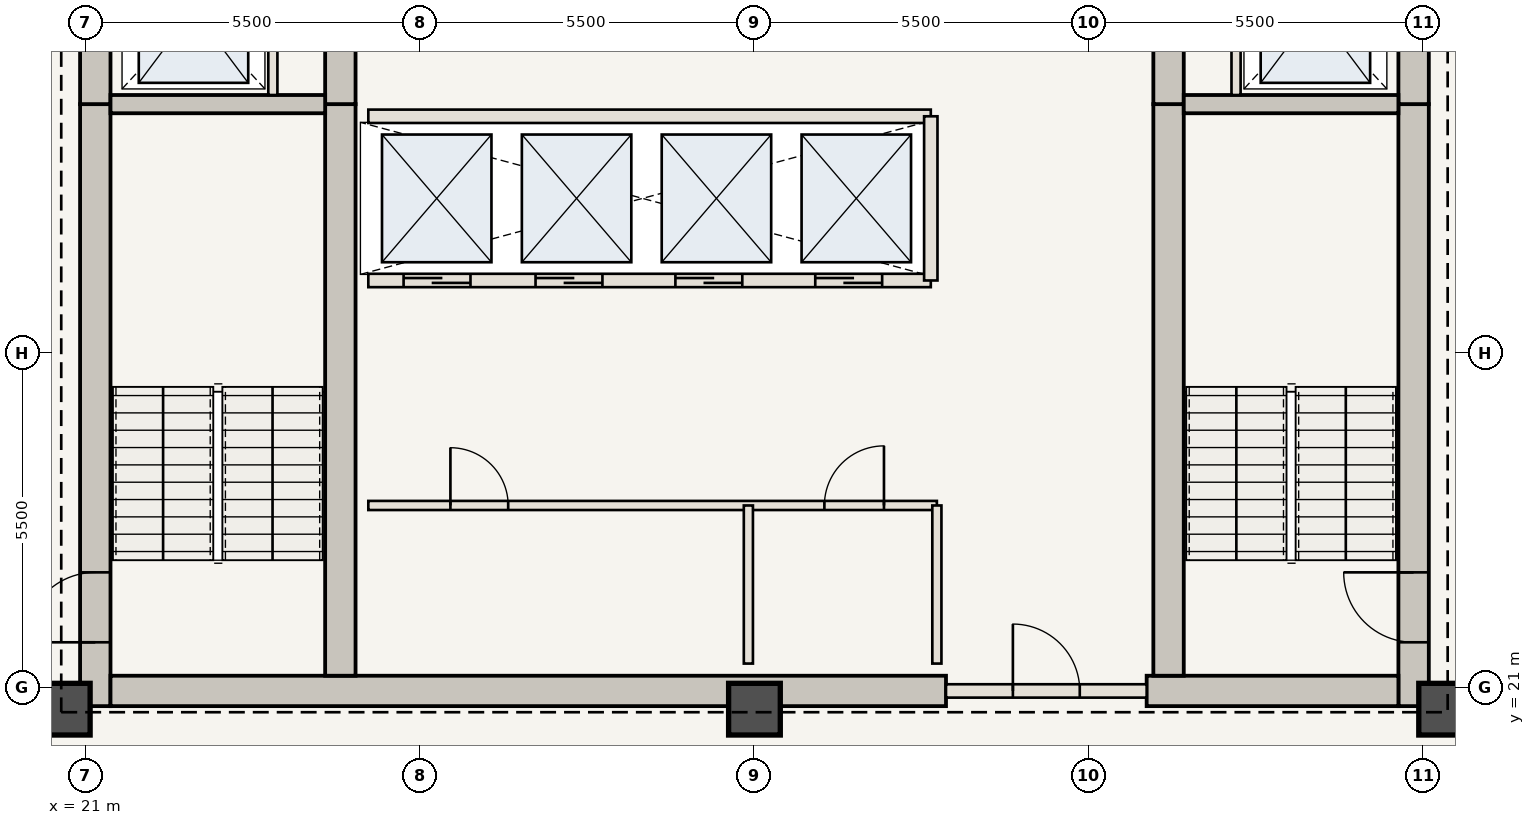
"""IFC4 building model, lengths in metres.
Left out: names, types, materials, properties, quantities, classifications, styles, units other than length and angle.
Written with IfcOpenShell. Run it as: python <this file> out.ifc"""

import sys

from ifc_helpers import new_model, si_unit, direction, frame, frame_2d, origin, origin_2d, place, context, subcontext, project, spatial, rectangle, extrude, element, fill, save


model = new_model("IFC4")
c1 = context("Model", 3, precision=1e-05, world=origin(), true_north=direction((0.0, 1.0)))
c2 = subcontext(c1, "Body", "Model", "MODEL_VIEW")
j1 = project(units=[si_unit("LENGTHUNIT", "METRE"), si_unit("PLANEANGLEUNIT", "RADIAN")], contexts=[c1])
p1 = place(None, origin())
s1 = spatial("IfcSite", under=j1, at=p1, CompositionType="ELEMENT")
p2 = place(p1, origin())
s2 = spatial("IfcBuilding", under=s1, at=p2, CompositionType="ELEMENT")
p3 = place(p2, frame((0.0, 0.0, 244.65)))
s3 = spatial("IfcBuildingStorey", under=s2, at=p3, CompositionType="ELEMENT", Elevation=244.65)
p4 = place(p3, frame((21.16, 20.7, 0.0), z_axis=(0.0, 0.0, 1.0), x_axis=(0.0, 1.0, 0.0)))
e1 = element("IfcWall", 1, at=p4, inside=s3, PredefinedType="SHEAR", context=c2, shape_type="SweptSolid", body=[
    extrude(rectangle(XDim=9.9, YDim=0.5, at=frame_2d((4.95, 0.0))), origin(), (0.0, 0.0, 1.0), 3.85),
])
p5 = place(p4, frame((1.05, 0.0, 0.0)))
e2 = element("IfcOpeningElement", 2, at=p5, cuts=e1, PredefinedType="OPENING", context=c2, shape_type="SweptSolid", body=[
    extrude(rectangle(XDim=1.15, YDim=2.15, at=frame_2d((0.575, 1.075))), frame((0.0, 0.26, 0.0), z_axis=(0.0, -1.0, 0.0), x_axis=(1.0, 0.0, 0.0)), (0.0, 0.0, 1.0), 0.52),
])
p6 = place(p3, frame((21.16, 30.6, 0.0), z_axis=(0.0, 0.0, 1.0), x_axis=(0.0, 1.0, 0.0)))
e3 = element("IfcWall", 3, at=p6, inside=s3, PredefinedType="SHEAR", context=c2, shape_type="SweptSolid", body=[
    extrude(rectangle(XDim=12.65, YDim=0.5, at=frame_2d((6.325, 0.0))), origin(), (0.0, 0.0, 1.0), 3.85),
])
p7 = place(p6, frame((4.2, 0.0, 0.0)))
e4 = element("IfcOpeningElement", 4, at=p7, cuts=e3, PredefinedType="OPENING", context=c2, shape_type="SweptSolid", body=[
    extrude(rectangle(XDim=1.1, YDim=2.15, at=frame_2d((0.55, 1.075))), frame((0.0, 0.26, 0.0), z_axis=(0.0, -1.0, 0.0), x_axis=(1.0, 0.0, 0.0)), (0.0, 0.0, 1.0), 0.52),
])
p8 = place(p6, frame((8.05, 0.0, 0.0)))
e5 = element("IfcOpeningElement", 5, at=p8, cuts=e3, PredefinedType="OPENING", context=c2, shape_type="SweptSolid", body=[
    extrude(rectangle(XDim=0.92, YDim=2.1, at=frame_2d((0.46, 1.05))), frame((0.0, 0.26, 0.0), z_axis=(0.0, -1.0, 0.0), x_axis=(1.0, 0.0, 0.0)), (0.0, 0.0, 1.0), 0.52),
])
p9 = place(p6, frame((9.45, 0.0, 0.0)))
e6 = element("IfcOpeningElement", 6, at=p9, cuts=e3, PredefinedType="OPENING", context=c2, shape_type="SweptSolid", body=[
    extrude(rectangle(XDim=0.88, YDim=2.1, at=frame_2d((0.44, 1.05))), frame((0.0, 0.26, 0.0), z_axis=(0.0, -1.0, 0.0), x_axis=(1.0, 0.0, 0.0)), (0.0, 0.0, 1.0), 0.52),
])
p10 = place(p6, frame((10.85, 0.0, 0.0)))
e7 = element("IfcOpeningElement", 7, at=p10, cuts=e3, PredefinedType="OPENING", context=c2, shape_type="SweptSolid", body=[
    extrude(rectangle(XDim=0.88, YDim=2.1, at=frame_2d((0.44, 1.05))), frame((0.0, 0.26, 0.0), z_axis=(0.0, -1.0, 0.0), x_axis=(1.0, 0.0, 0.0)), (0.0, 0.0, 1.0), 0.52),
])
p11 = place(p3, frame((42.84, 20.7, 0.0), z_axis=(0.0, 0.0, 1.0), x_axis=(0.0, 1.0, 0.0)))
e8 = element("IfcWall", 8, at=p11, inside=s3, PredefinedType="SHEAR", context=c2, shape_type="SweptSolid", body=[
    extrude(rectangle(XDim=9.9, YDim=0.5, at=frame_2d((4.95, 0.0))), origin(), (0.0, 0.0, 1.0), 3.85),
])
p12 = place(p11, frame((1.05, 0.0, 0.0)))
e9 = element("IfcOpeningElement", 9, at=p12, cuts=e8, PredefinedType="OPENING", context=c2, shape_type="SweptSolid", body=[
    extrude(rectangle(XDim=1.15, YDim=2.15, at=frame_2d((0.575, 1.075))), frame((0.0, 0.26, 0.0), z_axis=(0.0, -1.0, 0.0), x_axis=(1.0, 0.0, 0.0)), (0.0, 0.0, 1.0), 0.52),
])
p13 = place(p3, frame((42.84, 30.6, 0.0), z_axis=(0.0, 0.0, 1.0), x_axis=(0.0, 1.0, 0.0)))
e10 = element("IfcWall", 10, at=p13, inside=s3, PredefinedType="SHEAR", context=c2, shape_type="SweptSolid", body=[
    extrude(rectangle(XDim=12.65, YDim=0.5, at=frame_2d((6.325, 0.0))), origin(), (0.0, 0.0, 1.0), 3.85),
])
p14 = place(p13, frame((4.2, 0.0, 0.0)))
e11 = element("IfcOpeningElement", 11, at=p14, cuts=e10, PredefinedType="OPENING", context=c2, shape_type="SweptSolid", body=[
    extrude(rectangle(XDim=1.1, YDim=2.15, at=frame_2d((0.55, 1.075))), frame((0.0, 0.26, 0.0), z_axis=(0.0, -1.0, 0.0), x_axis=(1.0, 0.0, 0.0)), (0.0, 0.0, 1.0), 0.52),
])
p15 = place(p13, frame((9.2, 0.0, 0.0)))
e12 = element("IfcOpeningElement", 12, at=p15, cuts=e10, PredefinedType="OPENING", context=c2, shape_type="SweptSolid", body=[
    extrude(rectangle(XDim=0.92, YDim=2.1, at=frame_2d((0.46, 1.05))), frame((0.0, 0.26, 0.0), z_axis=(0.0, -1.0, 0.0), x_axis=(1.0, 0.0, 0.0)), (0.0, 0.0, 1.0), 0.52),
])
p16 = place(p3, frame((21.41, 20.95, 0.0), z_axis=(0.0, 0.0, 1.0), x_axis=(1.0, 0.0, 0.0)))
e13 = element("IfcWall", 13, at=p16, inside=s3, PredefinedType="SHEAR", context=c2, shape_type="SweptSolid", body=[
    extrude(rectangle(XDim=13.74, YDim=0.5, at=frame_2d((6.87, 0.0))), origin(), (0.0, 0.0, 1.0), 3.85),
])
p17 = place(p3, frame((38.45, 20.95, 0.0), z_axis=(0.0, 0.0, 1.0), x_axis=(1.0, 0.0, 0.0)))
e14 = element("IfcWall", 14, at=p17, inside=s3, PredefinedType="SHEAR", context=c2, shape_type="SweptSolid", body=[
    extrude(rectangle(XDim=4.14, YDim=0.5, at=frame_2d((2.07, 0.0))), origin(), (0.0, 0.0, 1.0), 3.85),
])
p18 = place(p3, frame((25.19, 21.2, 0.0), z_axis=(0.0, 0.0, 1.0), x_axis=(0.0, 1.0, 0.0)))
e15 = element("IfcWall", 15, at=p18, inside=s3, PredefinedType="SHEAR", context=c2, shape_type="SweptSolid", body=[
    extrude(rectangle(XDim=9.4, YDim=0.5, at=frame_2d((4.7, 0.0))), origin(), (0.0, 0.0, 1.0), 3.85),
])
p19 = place(p3, frame((25.19, 30.6, 0.0), z_axis=(0.0, 0.0, 1.0), x_axis=(0.0, 1.0, 0.0)))
e16 = element("IfcWall", 16, at=p19, inside=s3, PredefinedType="SHEAR", context=c2, shape_type="SweptSolid", body=[
    extrude(rectangle(XDim=12.15, YDim=0.5, at=frame_2d((6.075, 0.0))), origin(), (0.0, 0.0, 1.0), 3.85),
])
p20 = place(p19, frame((6.25, 0.0, 0.0)))
e17 = element("IfcOpeningElement", 17, at=p20, cuts=e16, PredefinedType="OPENING", context=c2, shape_type="SweptSolid", body=[
    extrude(rectangle(XDim=1.1, YDim=2.15, at=frame_2d((0.55, 1.075))), frame((0.0, 0.26, 0.0), z_axis=(0.0, -1.0, 0.0), x_axis=(1.0, 0.0, 0.0)), (0.0, 0.0, 1.0), 0.52),
])
p21 = place(p3, frame((38.81, 21.2, 0.0), z_axis=(0.0, 0.0, 1.0), x_axis=(0.0, 1.0, 0.0)))
e18 = element("IfcWall", 18, at=p21, inside=s3, PredefinedType="SHEAR", context=c2, shape_type="SweptSolid", body=[
    extrude(rectangle(XDim=9.4, YDim=0.5, at=frame_2d((4.7, 0.0))), origin(), (0.0, 0.0, 1.0), 3.85),
])
p22 = place(p3, frame((38.81, 30.6, 0.0), z_axis=(0.0, 0.0, 1.0), x_axis=(0.0, 1.0, 0.0)))
e19 = element("IfcWall", 19, at=p22, inside=s3, PredefinedType="SHEAR", context=c2, shape_type="SweptSolid", body=[
    extrude(rectangle(XDim=12.15, YDim=0.5, at=frame_2d((6.075, 0.0))), origin(), (0.0, 0.0, 1.0), 3.85),
])
for number, where, z_axis, x_axis in (
    (20, (20.65, 20.65, 0.0), (0.0, 0.0, 1.0), (1.0, 0.0, 0.0)),
    (21, (32.0, 20.65, 0.0), (0.0, 0.0, 1.0), (1.0, 0.0, 0.0)),
    (22, (43.35, 20.65, 0.0), (0.0, 0.0, 1.0), (1.0, 0.0, 0.0)),
):
    element("IfcColumn", number, at=place(p3, frame(where, z_axis=z_axis, x_axis=x_axis)), inside=s3, PredefinedType="COLUMN", context=c2, shape_type="SweptSolid", body=[
        extrude(rectangle(XDim=0.85, YDim=0.85, at=origin_2d()), origin(), (0.0, 0.0, 1.0), 3.85),
    ])
for number, where, z_axis, x_axis in (
    (23, (21.41, 30.6, 0.0), (0.0, 0.0, 1.0), (1.0, 0.0, 0.0)),
    (24, (39.06, 30.6, 0.0), (0.0, 0.0, 1.0), (1.0, 0.0, 0.0)),
):
    element("IfcWall", number, at=place(p3, frame(where, z_axis=z_axis, x_axis=x_axis)), inside=s3, PredefinedType="SHEAR", context=c2, shape_type="SweptSolid", body=[
        extrude(rectangle(XDim=3.53, YDim=0.3, at=frame_2d((1.765, 0.0))), origin(), (0.0, 0.0, 1.0), 3.685),
    ])
for number, where, z_axis, x_axis in (
    (25, (24.08, 30.75, 0.0), (0.0, 0.0, 1.0), (0.0, 1.0, 0.0)),
    (26, (39.92, 30.75, 0.0), (0.0, 0.0, 1.0), (0.0, 1.0, 0.0)),
):
    element("IfcWall", number, at=place(p3, frame(where, z_axis=z_axis, x_axis=x_axis)), inside=s3, PredefinedType="STANDARD", context=c2, shape_type="SweptSolid", body=[
        extrude(rectangle(XDim=2.65, YDim=0.15, at=frame_2d((1.325, 0.0))), origin(), (0.0, 0.0, 1.0), 3.685),
    ])
p23 = place(p3, frame((35.15, 20.95, 0.0), z_axis=(0.0, 0.0, 1.0), x_axis=(1.0, 0.0, 0.0)))
e27 = element("IfcWall", 27, at=p23, inside=s3, PredefinedType="STANDARD", context=c2, shape_type="SweptSolid", body=[
    extrude(rectangle(XDim=3.3, YDim=0.22, at=frame_2d((1.65, 0.0))), origin(), (0.0, 0.0, 1.0), 3.685),
])
p24 = place(p23, frame((1.1, 0.0, 0.0)))
e28 = element("IfcOpeningElement", 28, at=p24, cuts=e27, PredefinedType="OPENING", context=c2, shape_type="SweptSolid", body=[
    extrude(rectangle(XDim=1.1, YDim=2.15, at=frame_2d((0.55, 1.075))), frame((0.0, 0.12, 0.0), z_axis=(0.0, -1.0, 0.0), x_axis=(1.0, 0.0, 0.0)), (0.0, 0.0, 1.0), 0.24),
])
p25 = place(p3, frame((25.65, 24.0, 0.0), z_axis=(0.0, 0.0, 1.0), x_axis=(1.0, 0.0, 0.0)))
e29 = element("IfcWall", 29, at=p25, inside=s3, PredefinedType="STANDARD", context=c2, shape_type="SweptSolid", body=[
    extrude(rectangle(XDim=9.35, YDim=0.15, at=frame_2d((4.675, 0.0))), origin(), (0.0, 0.0, 1.0), 3.685),
])
p26 = place(p25, frame((1.35, 0.0, 0.0)))
e30 = element("IfcOpeningElement", 30, at=p26, cuts=e29, PredefinedType="OPENING", context=c2, shape_type="SweptSolid", body=[
    extrude(rectangle(XDim=0.95, YDim=2.15, at=frame_2d((0.475, 1.075))), frame((0.0, 0.085, 0.0), z_axis=(0.0, -1.0, 0.0), x_axis=(1.0, 0.0, 0.0)), (0.0, 0.0, 1.0), 0.17),
])
p27 = place(p25, frame((7.5, 0.0, 0.0)))
e31 = element("IfcOpeningElement", 31, at=p27, cuts=e29, PredefinedType="OPENING", context=c2, shape_type="SweptSolid", body=[
    extrude(rectangle(XDim=0.98, YDim=2.2, at=frame_2d((0.49, 1.1))), frame((0.0, 0.085, 0.0), z_axis=(0.0, -1.0, 0.0), x_axis=(1.0, 0.0, 0.0)), (0.0, 0.0, 1.0), 0.17),
])
for number, where, z_axis, x_axis in (
    (32, (31.9, 21.4, 0.0), (0.0, 0.0, 1.0), (0.0, 1.0, 0.0)),
    (33, (35.0, 21.4, 0.0), (0.0, 0.0, 1.0), (0.0, 1.0, 0.0)),
):
    element("IfcWall", number, at=place(p3, frame(where, z_axis=z_axis, x_axis=x_axis)), inside=s3, PredefinedType="STANDARD", context=c2, shape_type="SweptSolid", body=[
        extrude(rectangle(XDim=2.6, YDim=0.15, at=frame_2d((1.3, 0.0))), origin(), (0.0, 0.0, 1.0), 3.685),
    ])
p28 = place(p3, frame((25.65, 27.7, 0.0), z_axis=(0.0, 0.0, 1.0), x_axis=(1.0, 0.0, 0.0)))
e34 = element("IfcWall", 34, at=p28, inside=s3, PredefinedType="STANDARD", context=c2, shape_type="SweptSolid", body=[
    extrude(rectangle(XDim=9.25, YDim=0.22, at=frame_2d((4.625, 0.0))), origin(), (0.0, 0.0, 1.0), 3.685),
])
p29 = place(p28, frame((0.58, 0.0, 0.0)))
e35 = element("IfcOpeningElement", 35, at=p29, cuts=e34, PredefinedType="OPENING", context=c2, shape_type="SweptSolid", body=[
    extrude(rectangle(XDim=1.1, YDim=2.15, at=frame_2d((0.55, 1.075))), frame((0.0, 0.12, 0.0), z_axis=(0.0, -1.0, 0.0), x_axis=(1.0, 0.0, 0.0)), (0.0, 0.0, 1.0), 0.24),
])
p30 = place(p28, frame((2.75, 0.0, 0.0)))
e36 = element("IfcOpeningElement", 36, at=p30, cuts=e34, PredefinedType="OPENING", context=c2, shape_type="SweptSolid", body=[
    extrude(rectangle(XDim=1.1, YDim=2.15, at=frame_2d((0.55, 1.075))), frame((0.0, 0.12, 0.0), z_axis=(0.0, -1.0, 0.0), x_axis=(1.0, 0.0, 0.0)), (0.0, 0.0, 1.0), 0.24),
])
p31 = place(p28, frame((5.05, 0.0, 0.0)))
e37 = element("IfcOpeningElement", 37, at=p31, cuts=e34, PredefinedType="OPENING", context=c2, shape_type="SweptSolid", body=[
    extrude(rectangle(XDim=1.1, YDim=2.15, at=frame_2d((0.55, 1.075))), frame((0.0, 0.12, 0.0), z_axis=(0.0, -1.0, 0.0), x_axis=(1.0, 0.0, 0.0)), (0.0, 0.0, 1.0), 0.24),
])
p32 = place(p28, frame((7.35, 0.0, 0.0)))
e38 = element("IfcOpeningElement", 38, at=p32, cuts=e34, PredefinedType="OPENING", context=c2, shape_type="SweptSolid", body=[
    extrude(rectangle(XDim=1.1, YDim=2.15, at=frame_2d((0.55, 1.075))), frame((0.0, 0.12, 0.0), z_axis=(0.0, -1.0, 0.0), x_axis=(1.0, 0.0, 0.0)), (0.0, 0.0, 1.0), 0.24),
])
p33 = place(p3, frame((25.65, 30.4, 0.0), z_axis=(0.0, 0.0, 1.0), x_axis=(1.0, 0.0, 0.0)))
e39 = element("IfcWall", 39, at=p33, inside=s3, PredefinedType="STANDARD", context=c2, shape_type="SweptSolid", body=[
    extrude(rectangle(XDim=9.25, YDim=0.22, at=frame_2d((4.625, 0.0))), origin(), (0.0, 0.0, 1.0), 3.685),
])
p34 = place(p3, frame((34.9, 27.7, 0.0), z_axis=(0.0, 0.0, 1.0), x_axis=(0.0, 1.0, 0.0)))
e40 = element("IfcWall", 40, at=p34, inside=s3, PredefinedType="STANDARD", context=c2, shape_type="SweptSolid", body=[
    extrude(rectangle(XDim=2.7, YDim=0.22, at=frame_2d((1.35, 0.0))), origin(), (0.0, 0.0, 1.0), 3.685),
])
p35 = place(p5, origin())
e41 = element("IfcDoor", 41, at=p35, inside=s3, OperationType="SINGLE_SWING_LEFT", PredefinedType="DOOR", context=c2, shape_type="SweptSolid", body=[
    extrude(rectangle(XDim=1.15, YDim=2.15, at=frame_2d((0.575, 1.075))), frame((0.0, 0.025, 0.0), z_axis=(0.0, -1.0, 0.0), x_axis=(1.0, 0.0, 0.0)), (0.0, 0.0, 1.0), 0.05),
])
fill(e2, e41)
p36 = place(p12, origin())
e42 = element("IfcDoor", 42, at=p36, inside=s3, OperationType="SINGLE_SWING_RIGHT", PredefinedType="DOOR", context=c2, shape_type="SweptSolid", body=[
    extrude(rectangle(XDim=1.15, YDim=2.15, at=frame_2d((0.575, 1.075))), frame((0.0, 0.025, 0.0), z_axis=(0.0, -1.0, 0.0), x_axis=(1.0, 0.0, 0.0)), (0.0, 0.0, 1.0), 0.05),
])
fill(e9, e42)
p37 = place(p24, origin())
e43 = element("IfcDoor", 43, at=p37, inside=s3, OperationType="SINGLE_SWING_LEFT", PredefinedType="DOOR", context=c2, shape_type="SweptSolid", body=[
    extrude(rectangle(XDim=1.1, YDim=2.15, at=frame_2d((0.55, 1.075))), frame((0.0, 0.025, 0.0), z_axis=(0.0, -1.0, 0.0), x_axis=(1.0, 0.0, 0.0)), (0.0, 0.0, 1.0), 0.05),
])
fill(e28, e43)
p38 = place(p26, origin())
e44 = element("IfcDoor", 44, at=p38, inside=s3, OperationType="SINGLE_SWING_LEFT", PredefinedType="DOOR", context=c2, shape_type="SweptSolid", body=[
    extrude(rectangle(XDim=0.95, YDim=2.15, at=frame_2d((0.475, 1.075))), frame((0.0, 0.025, 0.0), z_axis=(0.0, -1.0, 0.0), x_axis=(1.0, 0.0, 0.0)), (0.0, 0.0, 1.0), 0.05),
])
fill(e30, e44)
p39 = place(p27, origin())
e45 = element("IfcDoor", 45, at=p39, inside=s3, OperationType="SINGLE_SWING_RIGHT", PredefinedType="DOOR", context=c2, shape_type="SweptSolid", body=[
    extrude(rectangle(XDim=0.98, YDim=2.2, at=frame_2d((0.49, 1.1))), frame((0.0, 0.025, 0.0), z_axis=(0.0, -1.0, 0.0), x_axis=(1.0, 0.0, 0.0)), (0.0, 0.0, 1.0), 0.05),
])
fill(e31, e45)
p40 = place(p29, origin())
e46 = element("IfcDoor", 46, at=p40, inside=s3, OperationType="DOUBLE_DOOR_SLIDING", PredefinedType="DOOR", context=c2, shape_type="SweptSolid", body=[
    extrude(rectangle(XDim=1.1, YDim=2.15, at=frame_2d((0.55, 1.075))), frame((0.0, 0.025, 0.0), z_axis=(0.0, -1.0, 0.0), x_axis=(1.0, 0.0, 0.0)), (0.0, 0.0, 1.0), 0.05),
])
fill(e35, e46)
p41 = place(p30, origin())
e47 = element("IfcDoor", 47, at=p41, inside=s3, OperationType="DOUBLE_DOOR_SLIDING", PredefinedType="DOOR", context=c2, shape_type="SweptSolid", body=[
    extrude(rectangle(XDim=1.1, YDim=2.15, at=frame_2d((0.55, 1.075))), frame((0.0, 0.025, 0.0), z_axis=(0.0, -1.0, 0.0), x_axis=(1.0, 0.0, 0.0)), (0.0, 0.0, 1.0), 0.05),
])
fill(e36, e47)
p42 = place(p31, origin())
e48 = element("IfcDoor", 48, at=p42, inside=s3, OperationType="DOUBLE_DOOR_SLIDING", PredefinedType="DOOR", context=c2, shape_type="SweptSolid", body=[
    extrude(rectangle(XDim=1.1, YDim=2.15, at=frame_2d((0.55, 1.075))), frame((0.0, 0.025, 0.0), z_axis=(0.0, -1.0, 0.0), x_axis=(1.0, 0.0, 0.0)), (0.0, 0.0, 1.0), 0.05),
])
fill(e37, e48)
p43 = place(p32, origin())
e49 = element("IfcDoor", 49, at=p43, inside=s3, OperationType="DOUBLE_DOOR_SLIDING", PredefinedType="DOOR", context=c2, shape_type="SweptSolid", body=[
    extrude(rectangle(XDim=1.1, YDim=2.15, at=frame_2d((0.55, 1.075))), frame((0.0, 0.025, 0.0), z_axis=(0.0, -1.0, 0.0), x_axis=(1.0, 0.0, 0.0)), (0.0, 0.0, 1.0), 0.05),
])
fill(e38, e49)
save(model, sys.argv[1])
